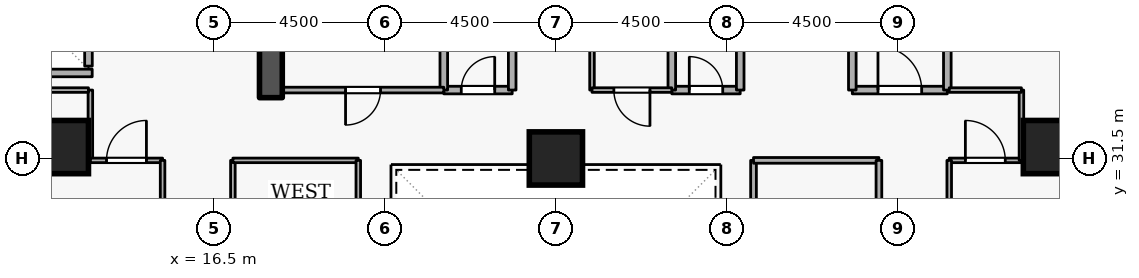
"""IFC4 building model, lengths in metres.
Left out: names, types, materials, properties, quantities, classifications, styles, units other than length and angle.
Written with IfcOpenShell. Run it as: python <this file> out.ifc"""

import sys

from ifc_helpers import new_model, si_unit, direction, frame, frame_2d, origin, origin_2d, place, context, subcontext, project, spatial, rectangle, extrude, element, fill, save


model = new_model("IFC4")
c1 = context("Model", 3, precision=1e-05, world=origin(), true_north=direction((0.0, 1.0)))
c2 = subcontext(c1, "Body", "Model", "MODEL_VIEW")
j1 = project(units=[si_unit("LENGTHUNIT", "METRE"), si_unit("PLANEANGLEUNIT", "RADIAN")], contexts=[c1])
p1 = place(None, origin())
s1 = spatial("IfcSite", under=j1, at=p1, CompositionType="ELEMENT")
p2 = place(p1, origin())
s2 = spatial("IfcBuilding", under=s1, at=p2, CompositionType="ELEMENT")
p3 = place(p2, frame((0.0, 0.0, 45.9)))
s3 = spatial("IfcBuildingStorey", under=s2, at=p3, CompositionType="ELEMENT", Elevation=45.9)
p4 = place(p3, frame((18.0, 33.1, 0.0), z_axis=(0.0, 0.0, 1.0), x_axis=(0.0, 1.0, 0.0)))
e1 = element("IfcWall", 1, at=p4, inside=s3, PredefinedType="SHEAR", context=c2, shape_type="SweptSolid", body=[
    extrude(rectangle(XDim=5.7, YDim=0.6, at=frame_2d((2.85, 0.0))), origin(), (0.0, 0.0, 1.0), 3.6),
])
for number, where, z_axis, x_axis in (
    (2, (12.5, 31.8, 0.0), (0.0, 0.0, 1.0), (1.0, 0.0, 0.0)),
    (3, (38.5, 31.8, 0.0), (0.0, 0.0, 1.0), (1.0, 0.0, 0.0)),
    (4, (25.5, 31.5, 0.0), (0.0, 0.0, 1.0), (1.0, 0.0, 0.0)),
):
    element("IfcColumn", number, at=place(p3, frame(where, z_axis=z_axis, x_axis=x_axis)), inside=s3, PredefinedType="COLUMN", context=c2, shape_type="SweptSolid", body=[
        extrude(rectangle(XDim=1.4, YDim=1.4, at=origin_2d()), origin(), (0.0, 0.0, 1.0), 3.6),
    ])
p5 = place(p3, frame((13.2, 33.93, 0.0), z_axis=(0.0, 0.0, 1.0), x_axis=(0.0, 1.0, 0.0)))
e5 = element("IfcWall", 5, at=p5, inside=s3, PredefinedType="STANDARD", context=c2, shape_type="SweptSolid", body=[
    extrude(rectangle(XDim=1.94, YDim=0.2, at=frame_2d((0.97, 0.0))), origin(), (0.0, 0.0, 1.0), 3.26),
])
p6 = place(p3, frame((11.002, 33.75, 0.0), z_axis=(0.0, 0.0, 1.0), x_axis=(1.0, 0.0, 0.0)))
e6 = element("IfcWall", 6, at=p6, inside=s3, PredefinedType="STANDARD", context=c2, shape_type="SweptSolid", body=[
    extrude(rectangle(XDim=2.296, YDim=0.2, at=frame_2d((1.148, 0.0))), origin(), (0.0, 0.0, 1.0), 3.26),
])
p7 = place(p3, frame((33.3, 33.3, 0.0), z_axis=(0.0, 0.0, 1.0), x_axis=(1.0, 0.0, 0.0)))
e7 = element("IfcWall", 7, at=p7, inside=s3, PredefinedType="STANDARD", context=c2, shape_type="SweptSolid", body=[
    extrude(rectangle(XDim=2.5, YDim=0.2, at=frame_2d((1.25, 0.0))), origin(), (0.0, 0.0, 1.0), 3.26),
])
p8 = place(p7, frame((0.675, 0.0, 0.0)))
e8 = element("IfcOpeningElement", 8, at=p8, cuts=e7, PredefinedType="OPENING", context=c2, shape_type="SweptSolid", body=[
    extrude(rectangle(XDim=1.15, YDim=2.1, at=frame_2d((0.575, 1.05))), frame((0.0, 0.11, 0.0), z_axis=(0.0, -1.0, 0.0), x_axis=(1.0, 0.0, 0.0)), (0.0, 0.0, 1.0), 0.22),
])
p9 = place(p3, frame((35.8, 33.3, 0.0), z_axis=(0.0, 0.0, 1.0), x_axis=(0.0, 1.0, 0.0)))
e9 = element("IfcWall", 9, at=p9, inside=s3, PredefinedType="STANDARD", context=c2, shape_type="SweptSolid", body=[
    extrude(rectangle(XDim=5.7, YDim=0.2, at=frame_2d((2.85, 0.0))), origin(), (0.0, 0.0, 1.0), 3.26),
])
p10 = place(p3, frame((33.3, 35.6, 0.0), z_axis=(0.0, 0.0, 1.0), x_axis=(0.0, -1.0, 0.0)))
e10 = element("IfcWall", 10, at=p10, inside=s3, PredefinedType="STANDARD", context=c2, shape_type="SweptSolid", body=[
    extrude(rectangle(XDim=2.3, YDim=0.2, at=frame_2d((1.15, 0.0))), origin(), (0.0, 0.0, 1.0), 2.465),
])
p11 = place(p3, frame((22.55, 33.3, 0.0), z_axis=(0.0, 0.0, 1.0), x_axis=(1.0, 0.0, 0.0)))
e11 = element("IfcWall", 11, at=p11, inside=s3, PredefinedType="STANDARD", context=c2, shape_type="SweptSolid", body=[
    extrude(rectangle(XDim=1.8, YDim=0.2, at=frame_2d((0.9, 0.0))), origin(), (0.0, 0.0, 1.0), 3.26),
])
p12 = place(p11, frame((0.46, 0.0, 0.0)))
e12 = element("IfcOpeningElement", 12, at=p12, cuts=e11, PredefinedType="OPENING", context=c2, shape_type="SweptSolid", body=[
    extrude(rectangle(XDim=0.88, YDim=2.04, at=frame_2d((0.44, 1.02))), frame((0.0, 0.11, 0.0), z_axis=(0.0, -1.0, 0.0), x_axis=(1.0, 0.0, 0.0)), (0.0, 0.0, 1.0), 0.22),
])
for number, where, z_axis, x_axis in (
    (13, (24.35, 33.3, 0.0), (0.0, 0.0, 1.0), (0.0, 1.0, 0.0)),
    (14, (22.55, 35.35, 0.0), (0.0, 0.0, 1.0), (0.0, -1.0, 0.0)),
):
    element("IfcWall", number, at=place(p3, frame(where, z_axis=z_axis, x_axis=x_axis)), inside=s3, PredefinedType="STANDARD", context=c2, shape_type="SweptSolid", body=[
        extrude(rectangle(XDim=2.05, YDim=0.2, at=frame_2d((1.025, 0.0))), origin(), (0.0, 0.0, 1.0), 3.26),
    ])
p13 = place(p3, frame((28.55, 33.3, 0.0), z_axis=(0.0, 0.0, 1.0), x_axis=(1.0, 0.0, 0.0)))
e15 = element("IfcWall", 15, at=p13, inside=s3, PredefinedType="STANDARD", context=c2, shape_type="SweptSolid", body=[
    extrude(rectangle(XDim=1.8, YDim=0.2, at=frame_2d((0.9, 0.0))), origin(), (0.0, 0.0, 1.0), 3.26),
])
p14 = place(p13, frame((0.46, 0.0, 0.0)))
e16 = element("IfcOpeningElement", 16, at=p14, cuts=e15, PredefinedType="OPENING", context=c2, shape_type="SweptSolid", body=[
    extrude(rectangle(XDim=0.88, YDim=2.04, at=frame_2d((0.44, 1.02))), frame((0.0, 0.11, 0.0), z_axis=(0.0, -1.0, 0.0), x_axis=(1.0, 0.0, 0.0)), (0.0, 0.0, 1.0), 0.22),
])
for number, where, z_axis, x_axis in (
    (17, (30.35, 33.3, 0.0), (0.0, 0.0, 1.0), (0.0, 1.0, 0.0)),
    (18, (28.55, 35.35, 0.0), (0.0, 0.0, 1.0), (0.0, -1.0, 0.0)),
):
    element("IfcWall", number, at=place(p3, frame(where, z_axis=z_axis, x_axis=x_axis)), inside=s3, PredefinedType="STANDARD", context=c2, shape_type="SweptSolid", body=[
        extrude(rectangle(XDim=2.05, YDim=0.2, at=frame_2d((1.025, 0.0))), origin(), (0.0, 0.0, 1.0), 3.26),
    ])
p15 = place(p3, frame((22.55, 33.3, 0.0), z_axis=(0.0, 0.0, 1.0), x_axis=(-1.0, 0.0, 0.0)))
e19 = element("IfcWall", 19, at=p15, inside=s3, PredefinedType="PARTITIONING", context=c2, shape_type="SweptSolid", body=[
    extrude(rectangle(XDim=4.25, YDim=0.15, at=frame_2d((2.125, 0.0))), origin(), (0.0, 0.0, 1.0), 3.26),
])
p16 = place(p15, frame((1.665, 0.0, 0.0)))
e20 = element("IfcOpeningElement", 20, at=p16, cuts=e19, PredefinedType="OPENING", context=c2, shape_type="SweptSolid", body=[
    extrude(rectangle(XDim=0.92, YDim=2.08, at=frame_2d((0.46, 1.04))), frame((0.0, 0.085, 0.0), z_axis=(0.0, -1.0, 0.0), x_axis=(1.0, 0.0, 0.0)), (0.0, 0.0, 1.0), 0.17),
])
p17 = place(p3, frame((26.45, 33.3, 0.0), z_axis=(0.0, 0.0, 1.0), x_axis=(0.0, 1.0, 0.0)))
e21 = element("IfcWall", 21, at=p17, inside=s3, PredefinedType="PARTITIONING", context=c2, shape_type="SweptSolid", body=[
    extrude(rectangle(XDim=2.05, YDim=0.12, at=frame_2d((1.025, 0.0))), origin(), (0.0, 0.0, 1.0), 3.26),
])
p18 = place(p3, frame((28.55, 33.3, 0.0), z_axis=(0.0, 0.0, 1.0), x_axis=(-1.0, 0.0, 0.0)))
e22 = element("IfcWall", 22, at=p18, inside=s3, PredefinedType="PARTITIONING", context=c2, shape_type="SweptSolid", body=[
    extrude(rectangle(XDim=2.1, YDim=0.12, at=frame_2d((1.05, 0.0))), origin(), (0.0, 0.0, 1.0), 3.26),
])
p19 = place(p18, frame((0.575, 0.0, 0.0)))
e23 = element("IfcOpeningElement", 23, at=p19, cuts=e22, PredefinedType="OPENING", context=c2, shape_type="SweptSolid", body=[
    extrude(rectangle(XDim=0.95, YDim=2.1, at=frame_2d((0.475, 1.05))), frame((0.0, 0.07, 0.0), z_axis=(0.0, -1.0, 0.0), x_axis=(1.0, 0.0, 0.0)), (0.0, 0.0, 1.0), 0.14),
])
p20 = place(p3, frame((13.25, 33.3, 0.0), z_axis=(0.0, 0.0, 1.0), x_axis=(0.0, -1.0, 0.0)))
e24 = element("IfcWall", 24, at=p20, inside=s3, PredefinedType="PARTITIONING", context=c2, shape_type="SweptSolid", body=[
    extrude(rectangle(XDim=1.85, YDim=0.12, at=frame_2d((0.925, 0.0))), origin(), (0.0, 0.0, 1.0), 3.26),
])
p21 = place(p3, frame((13.25, 31.45, 0.0), z_axis=(0.0, 0.0, 1.0), x_axis=(1.0, 0.0, 0.0)))
e25 = element("IfcWall", 25, at=p21, inside=s3, PredefinedType="PARTITIONING", context=c2, shape_type="SweptSolid", body=[
    extrude(rectangle(XDim=1.9, YDim=0.12, at=frame_2d((0.95, 0.0))), origin(), (0.0, 0.0, 1.0), 3.26),
])
p22 = place(p21, frame((0.425, 0.0, 0.0)))
e26 = element("IfcOpeningElement", 26, at=p22, cuts=e25, PredefinedType="OPENING", context=c2, shape_type="SweptSolid", body=[
    extrude(rectangle(XDim=1.05, YDim=2.1, at=frame_2d((0.525, 1.05))), frame((0.0, 0.07, 0.0), z_axis=(0.0, -1.0, 0.0), x_axis=(1.0, 0.0, 0.0)), (0.0, 0.0, 1.0), 0.14),
])
p23 = place(p3, frame((15.15, 31.45, 0.0), z_axis=(0.0, 0.0, 1.0), x_axis=(0.0, -1.0, 0.0)))
e27 = element("IfcWall", 27, at=p23, inside=s3, PredefinedType="PARTITIONING", context=c2, shape_type="SweptSolid", body=[
    extrude(rectangle(XDim=1.3, YDim=0.12, at=frame_2d((0.65, 0.0))), origin(), (0.0, 0.0, 1.0), 3.26),
])
p24 = place(p3, frame((10.9, 33.3, 0.0), z_axis=(0.0, 0.0, 1.0), x_axis=(1.0, 0.0, 0.0)))
e28 = element("IfcWall", 28, at=p24, inside=s3, PredefinedType="PARTITIONING", context=c2, shape_type="SweptSolid", body=[
    extrude(rectangle(XDim=2.3, YDim=0.12, at=frame_2d((1.15, 0.0))), origin(), (0.0, 0.0, 1.0), 3.26),
])
p25 = place(p3, frame((35.85, 31.45, 0.0), z_axis=(0.0, 0.0, 1.0), x_axis=(1.0, 0.0, 0.0)))
e29 = element("IfcWall", 29, at=p25, inside=s3, PredefinedType="PARTITIONING", context=c2, shape_type="SweptSolid", body=[
    extrude(rectangle(XDim=1.9, YDim=0.12, at=frame_2d((0.95, 0.0))), origin(), (0.0, 0.0, 1.0), 3.26),
])
p26 = place(p25, frame((0.425, 0.0, 0.0)))
e30 = element("IfcOpeningElement", 30, at=p26, cuts=e29, PredefinedType="OPENING", context=c2, shape_type="SweptSolid", body=[
    extrude(rectangle(XDim=1.05, YDim=2.1, at=frame_2d((0.525, 1.05))), frame((0.0, 0.07, 0.0), z_axis=(0.0, -1.0, 0.0), x_axis=(1.0, 0.0, 0.0)), (0.0, 0.0, 1.0), 0.14),
])
p27 = place(p3, frame((37.75, 31.45, 0.0), z_axis=(0.0, 0.0, 1.0), x_axis=(0.0, 1.0, 0.0)))
e31 = element("IfcWall", 31, at=p27, inside=s3, PredefinedType="PARTITIONING", context=c2, shape_type="SweptSolid", body=[
    extrude(rectangle(XDim=1.85, YDim=0.12, at=frame_2d((0.925, 0.0))), origin(), (0.0, 0.0, 1.0), 3.26),
])
p28 = place(p3, frame((37.75, 33.3, 0.0), z_axis=(0.0, 0.0, 1.0), x_axis=(-1.0, 0.0, 0.0)))
e32 = element("IfcWall", 32, at=p28, inside=s3, PredefinedType="PARTITIONING", context=c2, shape_type="SweptSolid", body=[
    extrude(rectangle(XDim=1.9, YDim=0.12, at=frame_2d((0.95, 0.0))), origin(), (0.0, 0.0, 1.0), 3.26),
])
p29 = place(p3, frame((35.85, 30.15, 0.0), z_axis=(0.0, 0.0, 1.0), x_axis=(0.0, 1.0, 0.0)))
e33 = element("IfcWall", 33, at=p29, inside=s3, PredefinedType="PARTITIONING", context=c2, shape_type="SweptSolid", body=[
    extrude(rectangle(XDim=1.3, YDim=0.12, at=frame_2d((0.65, 0.0))), origin(), (0.0, 0.0, 1.0), 3.26),
])
p30 = place(p3, frame((30.7, 22.55, 0.0), z_axis=(0.0, 0.0, 1.0), x_axis=(0.0, 1.0, 0.0)))
e34 = element("IfcWall", 34, at=p30, inside=s3, PredefinedType="PARTITIONING", context=c2, shape_type="SweptSolid", body=[
    extrude(rectangle(XDim=8.9, YDim=0.15, at=frame_2d((4.45, 0.0))), origin(), (0.0, 0.0, 1.0), 3.26),
])
p31 = place(p3, frame((30.7, 31.45, 0.0), z_axis=(0.0, 0.0, 1.0), x_axis=(1.0, 0.0, 0.0)))
e35 = element("IfcWall", 35, at=p31, inside=s3, PredefinedType="PARTITIONING", context=c2, shape_type="SweptSolid", body=[
    extrude(rectangle(XDim=3.3, YDim=0.15, at=frame_2d((1.65, 0.0))), origin(), (0.0, 0.0, 1.0), 3.26),
])
p32 = place(p3, frame((34.0, 31.45, 0.0), z_axis=(0.0, 0.0, 1.0), x_axis=(0.0, -1.0, 0.0)))
e36 = element("IfcWall", 36, at=p32, inside=s3, PredefinedType="PARTITIONING", context=c2, shape_type="SweptSolid", body=[
    extrude(rectangle(XDim=8.9, YDim=0.15, at=frame_2d((4.45, 0.0))), origin(), (0.0, 0.0, 1.0), 3.26),
])
p33 = place(p32, frame((2.48, 0.0, 0.0)))
e37 = element("IfcOpeningElement", 37, at=p33, cuts=e36, PredefinedType="OPENING", context=c2, shape_type="SweptSolid", body=[
    extrude(rectangle(XDim=1.3, YDim=2.12, at=frame_2d((0.65, 1.06))), frame((0.0, 0.085, 0.0), z_axis=(0.0, -1.0, 0.0), x_axis=(1.0, 0.0, 0.0)), (0.0, 0.0, 1.0), 0.17),
])
p34 = place(p3, frame((17.0, 22.55, 0.0), z_axis=(0.0, 0.0, 1.0), x_axis=(0.0, 1.0, 0.0)))
e38 = element("IfcWall", 38, at=p34, inside=s3, PredefinedType="PARTITIONING", context=c2, shape_type="SweptSolid", body=[
    extrude(rectangle(XDim=8.9, YDim=0.12, at=frame_2d((4.45, 0.0))), origin(), (0.0, 0.0, 1.0), 3.26),
])
p35 = place(p34, frame((3.975, 0.0, 0.0)))
e39 = element("IfcOpeningElement", 39, at=p35, cuts=e38, PredefinedType="OPENING", context=c2, shape_type="SweptSolid", body=[
    extrude(rectangle(XDim=0.95, YDim=2.1, at=frame_2d((0.475, 1.05))), frame((0.0, 0.07, 0.0), z_axis=(0.0, -1.0, 0.0), x_axis=(1.0, 0.0, 0.0)), (0.0, 0.0, 1.0), 0.14),
])
p36 = place(p3, frame((17.0, 31.45, 0.0), z_axis=(0.0, 0.0, 1.0), x_axis=(1.0, 0.0, 0.0)))
e40 = element("IfcWall", 40, at=p36, inside=s3, PredefinedType="PARTITIONING", context=c2, shape_type="SweptSolid", body=[
    extrude(rectangle(XDim=3.3, YDim=0.12, at=frame_2d((1.65, 0.0))), origin(), (0.0, 0.0, 1.0), 3.26),
])
p37 = place(p3, frame((20.3, 31.45, 0.0), z_axis=(0.0, 0.0, 1.0), x_axis=(0.0, -1.0, 0.0)))
e41 = element("IfcWall", 41, at=p37, inside=s3, PredefinedType="PARTITIONING", context=c2, shape_type="SweptSolid", body=[
    extrude(rectangle(XDim=8.9, YDim=0.12, at=frame_2d((4.45, 0.0))), origin(), (0.0, 0.0, 1.0), 3.26),
])
p38 = place(p8, origin())
e42 = element("IfcDoor", 42, at=p38, inside=s3, OperationType="SINGLE_SWING_LEFT", PredefinedType="DOOR", context=c2, shape_type="SweptSolid", body=[
    extrude(rectangle(XDim=1.15, YDim=2.1, at=frame_2d((0.575, 1.05))), frame((0.0, 0.025, 0.0), z_axis=(0.0, -1.0, 0.0), x_axis=(1.0, 0.0, 0.0)), (0.0, 0.0, 1.0), 0.05),
])
fill(e8, e42)
p39 = place(p12, origin())
e43 = element("IfcDoor", 43, at=p39, inside=s3, OperationType="SINGLE_SWING_RIGHT", PredefinedType="DOOR", context=c2, shape_type="SweptSolid", body=[
    extrude(rectangle(XDim=0.88, YDim=2.04, at=frame_2d((0.44, 1.02))), frame((0.0, 0.025, 0.0), z_axis=(0.0, -1.0, 0.0), x_axis=(1.0, 0.0, 0.0)), (0.0, 0.0, 1.0), 0.05),
])
fill(e12, e43)
p40 = place(p14, origin())
e44 = element("IfcDoor", 44, at=p40, inside=s3, OperationType="SINGLE_SWING_LEFT", PredefinedType="DOOR", context=c2, shape_type="SweptSolid", body=[
    extrude(rectangle(XDim=0.88, YDim=2.04, at=frame_2d((0.44, 1.02))), frame((0.0, 0.025, 0.0), z_axis=(0.0, -1.0, 0.0), x_axis=(1.0, 0.0, 0.0)), (0.0, 0.0, 1.0), 0.05),
])
fill(e16, e44)
p41 = place(p16, origin())
e45 = element("IfcDoor", 45, at=p41, inside=s3, OperationType="SINGLE_SWING_RIGHT", PredefinedType="DOOR", context=c2, shape_type="SweptSolid", body=[
    extrude(rectangle(XDim=0.92, YDim=2.08, at=frame_2d((0.46, 1.04))), frame((0.0, 0.025, 0.0), z_axis=(0.0, -1.0, 0.0), x_axis=(1.0, 0.0, 0.0)), (0.0, 0.0, 1.0), 0.05),
])
fill(e20, e45)
p42 = place(p19, origin())
e46 = element("IfcDoor", 46, at=p42, inside=s3, OperationType="SINGLE_SWING_LEFT", PredefinedType="DOOR", context=c2, shape_type="SweptSolid", body=[
    extrude(rectangle(XDim=0.95, YDim=2.1, at=frame_2d((0.475, 1.05))), frame((0.0, 0.025, 0.0), z_axis=(0.0, -1.0, 0.0), x_axis=(1.0, 0.0, 0.0)), (0.0, 0.0, 1.0), 0.05),
])
fill(e23, e46)
p43 = place(p22, origin())
e47 = element("IfcDoor", 47, at=p43, inside=s3, OperationType="SINGLE_SWING_RIGHT", PredefinedType="DOOR", context=c2, shape_type="SweptSolid", body=[
    extrude(rectangle(XDim=1.05, YDim=2.1, at=frame_2d((0.525, 1.05))), frame((0.0, 0.025, 0.0), z_axis=(0.0, -1.0, 0.0), x_axis=(1.0, 0.0, 0.0)), (0.0, 0.0, 1.0), 0.05),
])
fill(e26, e47)
p44 = place(p26, origin())
e48 = element("IfcDoor", 48, at=p44, inside=s3, OperationType="SINGLE_SWING_LEFT", PredefinedType="DOOR", context=c2, shape_type="SweptSolid", body=[
    extrude(rectangle(XDim=1.05, YDim=2.1, at=frame_2d((0.525, 1.05))), frame((0.0, 0.025, 0.0), z_axis=(0.0, -1.0, 0.0), x_axis=(1.0, 0.0, 0.0)), (0.0, 0.0, 1.0), 0.05),
])
fill(e30, e48)
save(model, sys.argv[1])
